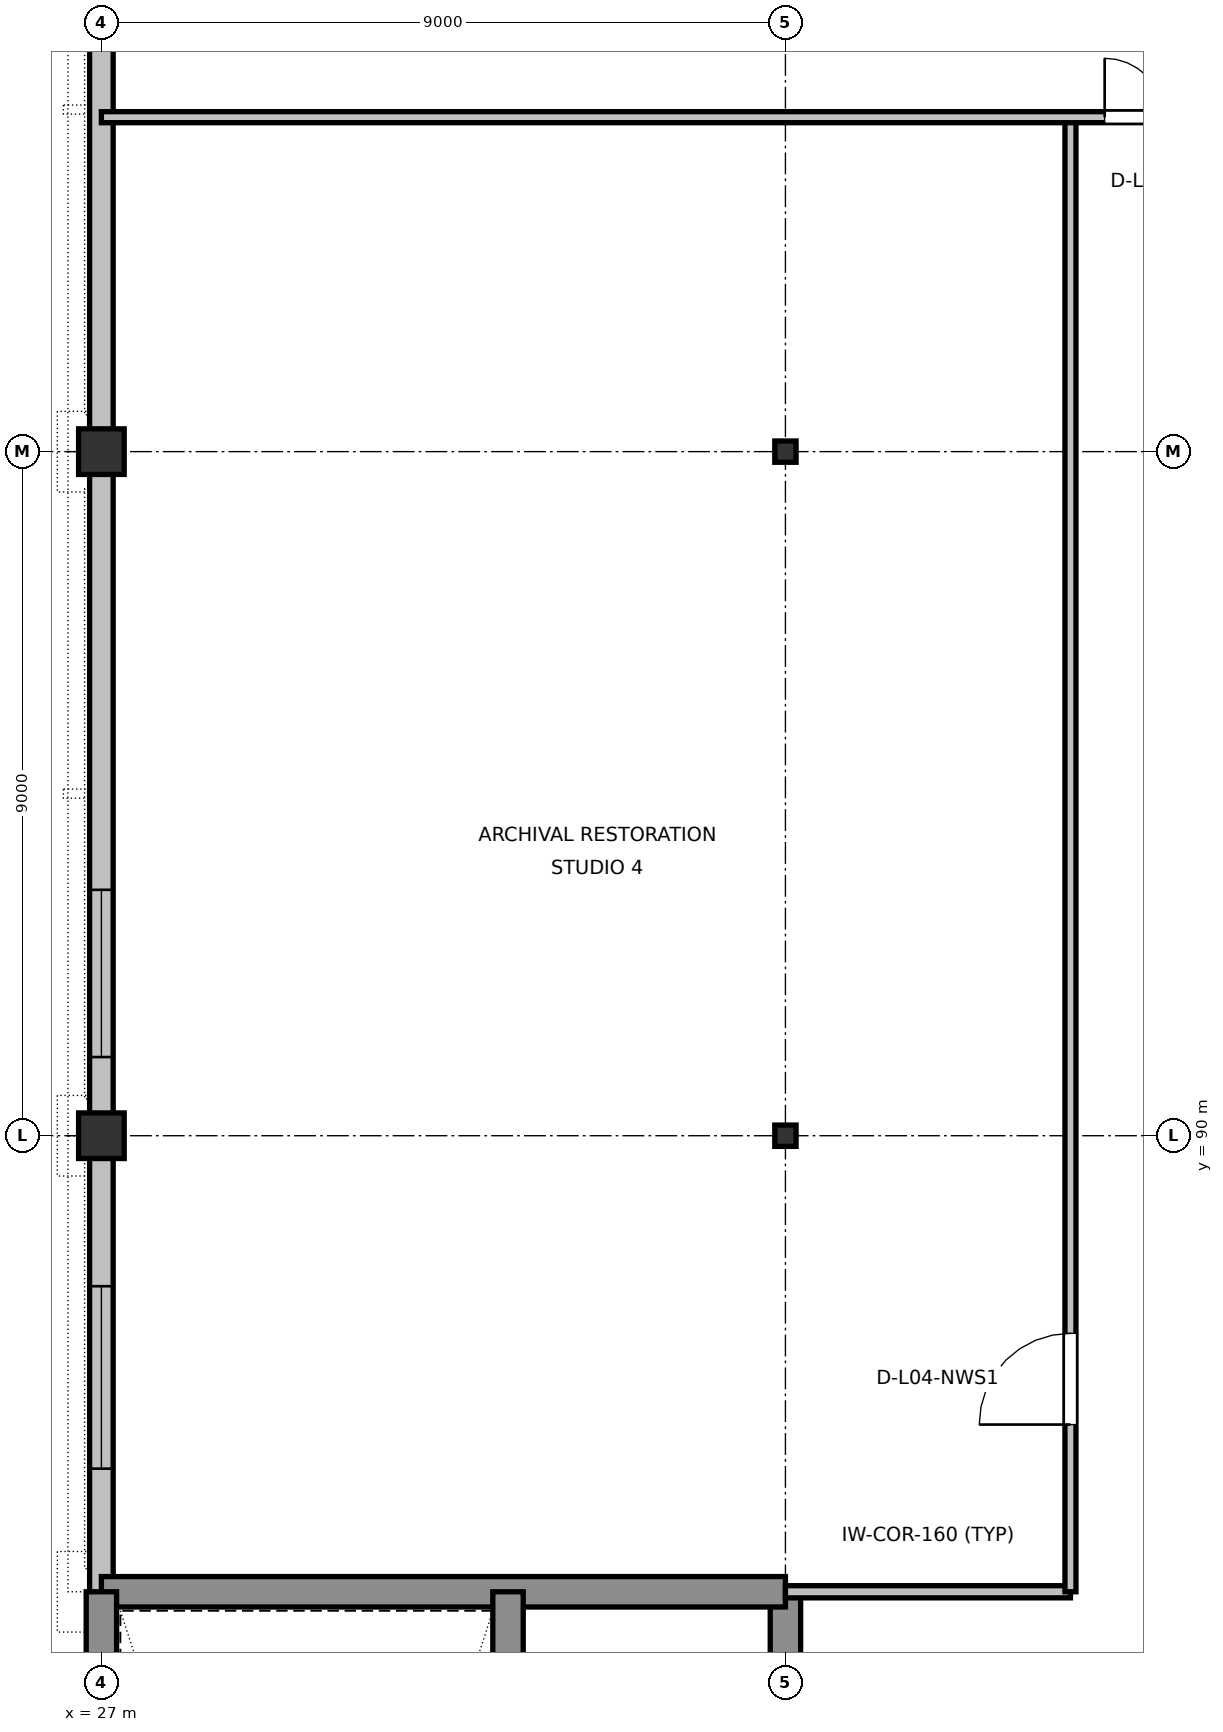
"""IFC4 building model, lengths in metres.
Left out: names, types, materials, properties, quantities, classifications, styles, units other than length and angle.
Written with IfcOpenShell. Run it as: python <this file> out.ifc"""

import sys

from ifc_helpers import new_model, si_unit, direction, frame, frame_2d, origin, origin_2d, place, context, subcontext, project, spatial, rectangle, i_section, extrude, element, fill, save


model = new_model("IFC4")
c1 = context("Model", 3, precision=1e-05, world=origin(), true_north=direction((0.0, 1.0)))
c2 = subcontext(c1, "Body", "Model", "MODEL_VIEW")
j1 = project(units=[si_unit("LENGTHUNIT", "METRE"), si_unit("PLANEANGLEUNIT", "RADIAN")], contexts=[c1])
p1 = place(None, origin())
s1 = spatial("IfcSite", under=j1, at=p1, CompositionType="ELEMENT")
p2 = place(p1, origin())
s2 = spatial("IfcBuilding", under=s1, at=p2, CompositionType="ELEMENT")
p3 = place(p2, frame((0.0, 0.0, 19.2)))
s3 = spatial("IfcBuildingStorey", under=s2, at=p3, CompositionType="ELEMENT", Elevation=19.2)
for number, where, z_axis, x_axis in (
    (1, (27.0, 90.0, 0.0), (0.0, 0.0, 1.0), (1.0, 0.0, 0.0)),
    (2, (27.0, 99.0, 0.0), (0.0, 0.0, 1.0), (1.0, 0.0, 0.0)),
):
    element("IfcColumn", number, at=place(p3, frame(where, z_axis=z_axis, x_axis=x_axis)), inside=s3, PredefinedType="COLUMN", context=c2, shape_type="SweptSolid", body=[
        extrude(rectangle(XDim=0.6, YDim=0.6, at=origin_2d()), origin(), (0.0, 0.0, 1.0), 4.2),
    ])
for number, where, z_axis, x_axis in (
    (3, (36.0, 90.0, 0.0), (0.0, 0.0, 1.0), (1.0, 0.0, 0.0)),
    (4, (36.0, 99.0, 0.0), (0.0, 0.0, 1.0), (1.0, 0.0, 0.0)),
):
    element("IfcColumn", number, at=place(p3, frame(where, z_axis=z_axis, x_axis=x_axis)), inside=s3, PredefinedType="COLUMN", context=c2, shape_type="SweptSolid", body=[
        extrude(i_section(OverallWidth=0.28, OverallDepth=0.28, WebThickness=0.01, FlangeThickness=0.018, at=origin_2d()), origin(), (0.0, 0.0, 1.0), 4.2),
    ])
p4 = place(p3, frame((27.0, 89.715, 0.0), z_axis=(0.0, 0.0, 1.0), x_axis=(0.0, -1.0, 0.0)))
e5 = element("IfcWall", 5, at=p4, inside=s3, PredefinedType="STANDARD", context=c2, shape_type="SweptSolid", body=[
    extrude(rectangle(XDim=5.79, YDim=0.31, at=frame_2d((2.895, 0.0))), origin(), (0.0, 0.0, 1.0), 3.635),
])
p5 = place(p4, frame((1.695, 0.0, 0.9)))
e6 = element("IfcOpeningElement", 6, at=p5, cuts=e5, PredefinedType="OPENING", context=c2, shape_type="SweptSolid", body=[
    extrude(rectangle(XDim=2.4, YDim=1.7, at=frame_2d((1.2, 0.85))), frame((0.0, 0.165, 0.0), z_axis=(0.0, -1.0, 0.0), x_axis=(1.0, 0.0, 0.0)), (0.0, 0.0, 1.0), 0.33),
])
p6 = place(p3, frame((27.0, 98.715, 0.0), z_axis=(0.0, 0.0, 1.0), x_axis=(0.0, -1.0, 0.0)))
e7 = element("IfcWall", 7, at=p6, inside=s3, PredefinedType="STANDARD", context=c2, shape_type="SweptSolid", body=[
    extrude(rectangle(XDim=8.43, YDim=0.31, at=frame_2d((4.215, 0.0))), origin(), (0.0, 0.0, 1.0), 3.635),
])
p7 = place(p6, frame((5.48, 0.0, 0.9)))
e8 = element("IfcOpeningElement", 8, at=p7, cuts=e7, PredefinedType="OPENING", context=c2, shape_type="SweptSolid", body=[
    extrude(rectangle(XDim=2.2, YDim=1.65, at=frame_2d((1.1, 0.825))), frame((0.0, 0.165, 0.0), z_axis=(0.0, -1.0, 0.0), x_axis=(1.0, 0.0, 0.0)), (0.0, 0.0, 1.0), 0.33),
])
p8 = place(p3, frame((27.0, 107.715, 0.0), z_axis=(0.0, 0.0, 1.0), x_axis=(0.0, -1.0, 0.0)))
e9 = element("IfcWall", 9, at=p8, inside=s3, PredefinedType="STANDARD", context=c2, shape_type="SweptSolid", body=[
    extrude(rectangle(XDim=8.43, YDim=0.31, at=frame_2d((4.215, 0.0))), origin(), (0.0, 0.0, 1.0), 3.635),
])
p9 = place(p8, frame((0.75, 0.0, 0.9)))
e10 = element("IfcOpeningElement", 10, at=p9, cuts=e9, PredefinedType="OPENING", context=c2, shape_type="SweptSolid", body=[
    extrude(rectangle(XDim=2.0, YDim=1.6, at=frame_2d((1.0, 0.8))), frame((0.0, 0.165, 0.0), z_axis=(0.0, -1.0, 0.0), x_axis=(1.0, 0.0, 0.0)), (0.0, 0.0, 1.0), 0.33),
])
p10 = place(p3, frame((36.0, 66.0, 0.0), z_axis=(0.0, 0.0, 1.0), x_axis=(0.0, 1.0, 0.0)))
e11 = element("IfcWall", 11, at=p10, inside=s3, PredefinedType="SHEAR", context=c2, shape_type="SweptSolid", body=[
    extrude(rectangle(XDim=18.0, YDim=0.4, at=frame_2d((9.0, 0.0))), origin(), (0.0, 0.0, 1.0), 3.96),
])
p11 = place(p10, frame((0.8, 0.0, 0.0)))
e12 = element("IfcOpeningElement", 12, at=p11, cuts=e11, PredefinedType="OPENING", context=c2, shape_type="SweptSolid", body=[
    extrude(rectangle(XDim=1.1, YDim=2.16, at=frame_2d((0.55, 1.08))), frame((0.0, 0.21, 0.0), z_axis=(0.0, -1.0, 0.0), x_axis=(1.0, 0.0, 0.0)), (0.0, 0.0, 1.0), 0.42),
])
p12 = place(p10, frame((3.2, 0.0, 0.0)))
e13 = element("IfcOpeningElement", 13, at=p12, cuts=e11, PredefinedType="OPENING", context=c2, shape_type="SweptSolid", body=[
    extrude(rectangle(XDim=1.2, YDim=2.2, at=frame_2d((0.6, 1.1))), frame((0.0, 0.21, 0.0), z_axis=(0.0, -1.0, 0.0), x_axis=(1.0, 0.0, 0.0)), (0.0, 0.0, 1.0), 0.42),
])
p13 = place(p10, frame((6.8, 0.0, 0.0)))
e14 = element("IfcOpeningElement", 14, at=p13, cuts=e11, PredefinedType="OPENING", context=c2, shape_type="SweptSolid", body=[
    extrude(rectangle(XDim=0.85, YDim=2.1, at=frame_2d((0.425, 1.05))), frame((0.0, 0.21, 0.0), z_axis=(0.0, -1.0, 0.0), x_axis=(1.0, 0.0, 0.0)), (0.0, 0.0, 1.0), 0.42),
])
p14 = place(p3, frame((36.0, 84.0, 0.0), z_axis=(0.0, 0.0, 1.0), x_axis=(-1.0, 0.0, 0.0)))
e15 = element("IfcWall", 15, at=p14, inside=s3, PredefinedType="SHEAR", context=c2, shape_type="SweptSolid", body=[
    extrude(rectangle(XDim=9.0, YDim=0.4, at=frame_2d((4.5, 0.0))), origin(), (0.0, 0.0, 1.0), 3.96),
])
p15 = place(p3, frame((27.0, 84.0, 0.0), z_axis=(0.0, 0.0, 1.0), x_axis=(0.0, -1.0, 0.0)))
e16 = element("IfcWall", 16, at=p15, inside=s3, PredefinedType="SHEAR", context=c2, shape_type="SweptSolid", body=[
    extrude(rectangle(XDim=18.0, YDim=0.4, at=frame_2d((9.0, 0.0))), origin(), (0.0, 0.0, 1.0), 3.96),
])
p16 = place(p3, frame((32.35, 66.0, 0.0), z_axis=(0.0, 0.0, 1.0), x_axis=(0.0, 1.0, 0.0)))
e17 = element("IfcWall", 17, at=p16, inside=s3, PredefinedType="SHEAR", context=c2, shape_type="SweptSolid", body=[
    extrude(rectangle(XDim=18.0, YDim=0.4, at=frame_2d((9.0, 0.0))), origin(), (0.0, 0.0, 1.0), 3.96),
])
p17 = place(p16, frame((0.7, 0.0, 0.0)))
e18 = element("IfcOpeningElement", 18, at=p17, cuts=e17, PredefinedType="OPENING", context=c2, shape_type="SweptSolid", body=[
    extrude(rectangle(XDim=1.1, YDim=2.16, at=frame_2d((0.55, 1.08))), frame((0.0, 0.21, 0.0), z_axis=(0.0, -1.0, 0.0), x_axis=(1.0, 0.0, 0.0)), (0.0, 0.0, 1.0), 0.42),
])
p18 = place(p3, frame((36.0, 84.0, 0.0), z_axis=(0.0, 0.0, 1.0), x_axis=(1.0, 0.0, 0.0)))
e19 = element("IfcWall", 19, at=p18, inside=s3, PredefinedType="PARTITIONING", context=c2, shape_type="SweptSolid", body=[
    extrude(rectangle(XDim=3.75, YDim=0.16, at=frame_2d((1.875, 0.0))), origin(), (0.0, 0.0, 1.0), 3.675),
])
p19 = place(p3, frame((39.75, 84.0, 0.0), z_axis=(0.0, 0.0, 1.0), x_axis=(0.0, 1.0, 0.0)))
e20 = element("IfcWall", 20, at=p19, inside=s3, PredefinedType="PARTITIONING", context=c2, shape_type="SweptSolid", body=[
    extrude(rectangle(XDim=19.4, YDim=0.145, at=frame_2d((9.7, 0.0))), origin(), (0.0, 0.0, 1.0), 3.96),
])
p20 = place(p19, frame((2.2, 0.0, 0.0)))
e21 = element("IfcOpeningElement", 21, at=p20, cuts=e20, PredefinedType="OPENING", context=c2, shape_type="SweptSolid", body=[
    extrude(rectangle(XDim=1.2, YDim=2.18, at=frame_2d((0.6, 1.09))), frame((0.0, 0.083, 0.0), z_axis=(0.0, -1.0, 0.0), x_axis=(1.0, 0.0, 0.0)), (0.0, 0.0, 1.0), 0.165),
])
p21 = place(p3, frame((27.0, 103.4, 0.0), z_axis=(0.0, 0.0, 1.0), x_axis=(1.0, 0.0, 0.0)))
e22 = element("IfcWall", 22, at=p21, inside=s3, PredefinedType="PARTITIONING", context=c2, shape_type="SweptSolid", body=[
    extrude(rectangle(XDim=45.0, YDim=0.145, at=frame_2d((22.5, 0.0))), origin(), (0.0, 0.0, 1.0), 3.96),
])
p22 = place(p21, frame((13.2, 0.0, 0.0)))
e23 = element("IfcOpeningElement", 23, at=p22, cuts=e22, PredefinedType="OPENING", context=c2, shape_type="SweptSolid", body=[
    extrude(rectangle(XDim=1.55, YDim=2.24, at=frame_2d((0.775, 1.12))), frame((0.0, 0.083, 0.0), z_axis=(0.0, -1.0, 0.0), x_axis=(1.0, 0.0, 0.0)), (0.0, 0.0, 1.0), 0.165),
])
p23 = place(p21, frame((28.8, 0.0, 0.0)))
e24 = element("IfcOpeningElement", 24, at=p23, cuts=e22, PredefinedType="OPENING", context=c2, shape_type="SweptSolid", body=[
    extrude(rectangle(XDim=1.55, YDim=2.24, at=frame_2d((0.775, 1.12))), frame((0.0, 0.083, 0.0), z_axis=(0.0, -1.0, 0.0), x_axis=(1.0, 0.0, 0.0)), (0.0, 0.0, 1.0), 0.165),
])
p24 = place(p5, origin())
e25 = element("IfcWindow", 25, at=p24, inside=s3, PartitioningType="SINGLE_PANEL", PredefinedType="WINDOW", context=c2, shape_type="SweptSolid", body=[
    extrude(rectangle(XDim=2.4, YDim=1.7, at=frame_2d((1.2, 0.85))), frame((0.0, 0.03, 0.0), z_axis=(0.0, -1.0, 0.0), x_axis=(1.0, 0.0, 0.0)), (0.0, 0.0, 1.0), 0.06),
])
fill(e6, e25)
p25 = place(p7, origin())
e26 = element("IfcWindow", 26, at=p25, inside=s3, PartitioningType="SINGLE_PANEL", PredefinedType="WINDOW", context=c2, shape_type="SweptSolid", body=[
    extrude(rectangle(XDim=2.2, YDim=1.65, at=frame_2d((1.1, 0.825))), frame((0.0, 0.03, 0.0), z_axis=(0.0, -1.0, 0.0), x_axis=(1.0, 0.0, 0.0)), (0.0, 0.0, 1.0), 0.06),
])
fill(e8, e26)
p26 = place(p20, origin())
e27 = element("IfcDoor", 27, at=p26, inside=s3, OperationType="SINGLE_SWING_LEFT", PredefinedType="DOOR", context=c2, shape_type="SweptSolid", body=[
    extrude(rectangle(XDim=1.2, YDim=2.18, at=frame_2d((0.6, 1.09))), frame((0.0, 0.025, 0.0), z_axis=(0.0, -1.0, 0.0), x_axis=(1.0, 0.0, 0.0)), (0.0, 0.0, 1.0), 0.05),
])
fill(e21, e27)
p27 = place(p22, origin())
e28 = element("IfcDoor", 28, at=p27, inside=s3, OperationType="DOUBLE_DOOR_SINGLE_SWING", PredefinedType="DOOR", context=c2, shape_type="SweptSolid", body=[
    extrude(rectangle(XDim=1.55, YDim=2.24, at=frame_2d((0.775, 1.12))), frame((0.0, 0.025, 0.0), z_axis=(0.0, -1.0, 0.0), x_axis=(1.0, 0.0, 0.0)), (0.0, 0.0, 1.0), 0.05),
])
fill(e23, e28)
save(model, sys.argv[1])
